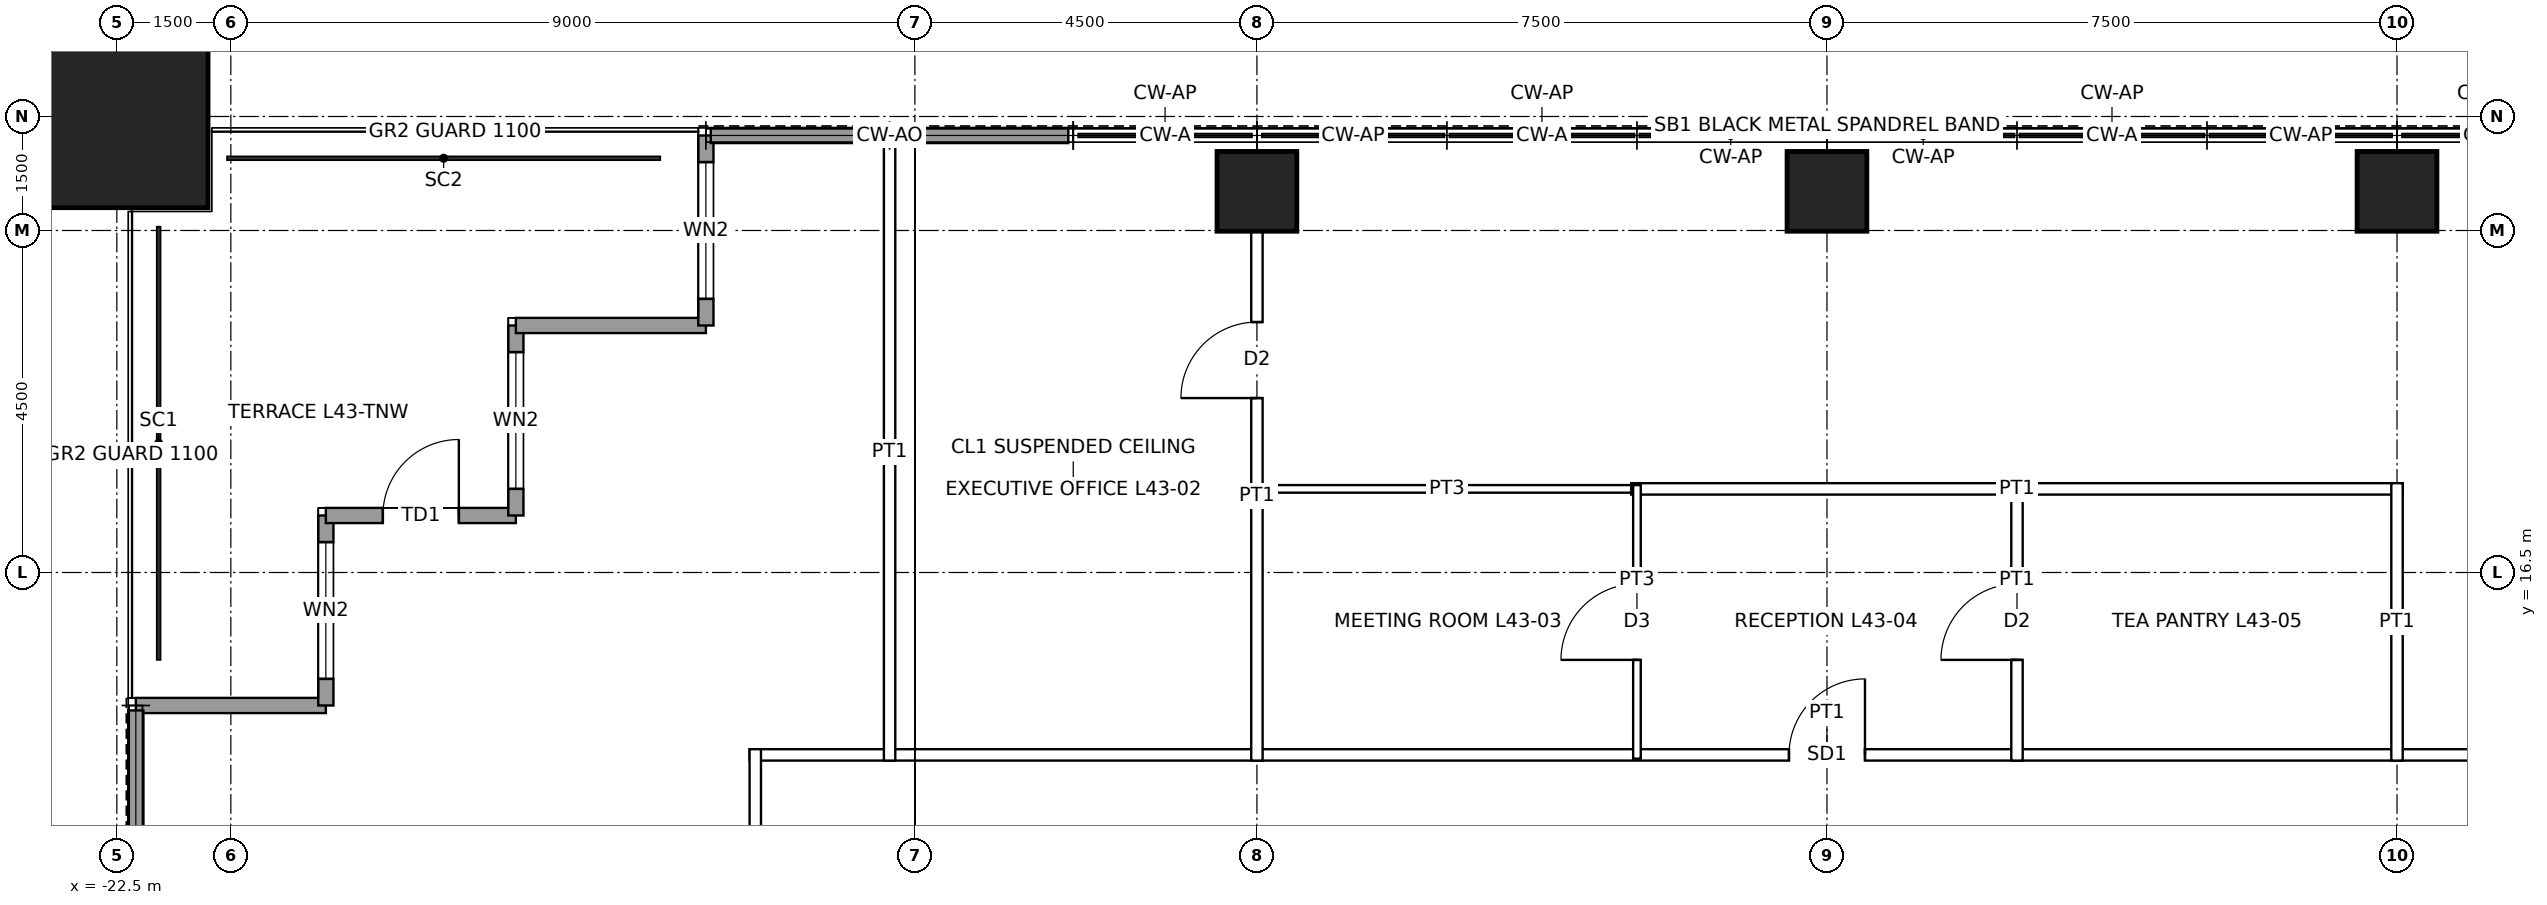
"""IFC4 building model, lengths in metres.
Left out: names, types, materials, properties, quantities, classifications, styles, units other than length and angle.
Written with IfcOpenShell. Run it as: python <this file> out.ifc"""

import sys

from ifc_helpers import new_model, si_unit, direction, frame, frame_2d, origin, origin_2d, place, context, subcontext, project, spatial, rectangle, hollow_rectangle, extrude, element, fill, save


model = new_model("IFC4")
c1 = context("Model", 3, precision=1e-05, world=origin(), true_north=direction((0.0, 1.0)))
c2 = subcontext(c1, "Body", "Model", "MODEL_VIEW")
j1 = project(units=[si_unit("LENGTHUNIT", "METRE"), si_unit("PLANEANGLEUNIT", "RADIAN")], contexts=[c1])
p1 = place(None, origin())
s1 = spatial("IfcSite", under=j1, at=p1, CompositionType="ELEMENT")
p2 = place(p1, origin())
s2 = spatial("IfcBuilding", under=s1, at=p2, CompositionType="ELEMENT")
p3 = place(p2, frame((0.0, 0.0, 205.9)))
s3 = spatial("IfcBuildingStorey", under=s2, at=p3, CompositionType="ELEMENT", Elevation=205.9)
p4 = place(p3, frame((-22.5, 22.5, 0.0), z_axis=(0.0, 0.0, 1.0), x_axis=(1.0, 0.0, 0.0)))
e1 = element("IfcColumn", 1, at=p4, inside=s3, PredefinedType="COLUMN", context=c2, shape_type="SweptSolid", body=[
    extrude(hollow_rectangle(XDim=2.4, YDim=2.4, WallThickness=0.12, at=origin_2d()), origin(), (0.0, 0.0, 1.0), 4.0),
])
for number, where, z_axis, x_axis in (
    (2, (-7.5, 21.515, 0.0), (0.0, 0.0, 1.0), (1.0, 0.0, 0.0)),
    (3, (0.0, 21.515, 0.0), (0.0, 0.0, 1.0), (1.0, 0.0, 0.0)),
    (4, (7.5, 21.515, 0.0), (0.0, 0.0, 1.0), (1.0, 0.0, 0.0)),
):
    element("IfcColumn", number, at=place(p3, frame(where, z_axis=z_axis, x_axis=x_axis)), inside=s3, PredefinedType="COLUMN", context=c2, shape_type="SweptSolid", body=[
        extrude(hollow_rectangle(XDim=1.05, YDim=1.05, WallThickness=0.07, at=origin_2d()), origin(), (0.0, 0.0, 1.0), 4.0),
    ])
p5 = place(p3, frame((-22.25, 14.75, 0.0), z_axis=(0.0, 0.0, 1.0), x_axis=(1.0, 0.0, 0.0)))
e5 = element("IfcWall", 5, at=p5, inside=s3, PredefinedType="SOLIDWALL", context=c2, shape_type="SweptSolid", body=[
    extrude(rectangle(XDim=2.5, YDim=0.2, at=frame_2d((1.25, 0.0))), origin(), (0.0, 0.0, 1.0), 3.85),
])
p6 = place(p3, frame((-19.75, 14.75, 0.0), z_axis=(0.0, 0.0, 1.0), x_axis=(0.0, 1.0, 0.0)))
e6 = element("IfcWall", 6, at=p6, inside=s3, PredefinedType="SOLIDWALL", context=c2, shape_type="SweptSolid", body=[
    extrude(rectangle(XDim=2.5, YDim=0.2, at=frame_2d((1.25, 0.0))), origin(), (0.0, 0.0, 1.0), 3.85),
])
p7 = place(p6, frame((0.35, 0.0, 0.3)))
e7 = element("IfcOpeningElement", 7, at=p7, cuts=e6, PredefinedType="OPENING", context=c2, shape_type="SweptSolid", body=[
    extrude(rectangle(XDim=1.8, YDim=2.4, at=frame_2d((0.9, 1.2))), frame((0.0, 0.11, 0.0), z_axis=(0.0, -1.0, 0.0), x_axis=(1.0, 0.0, 0.0)), (0.0, 0.0, 1.0), 0.22),
])
p8 = place(p3, frame((-19.75, 17.25, 0.0), z_axis=(0.0, 0.0, 1.0), x_axis=(1.0, 0.0, 0.0)))
e8 = element("IfcWall", 8, at=p8, inside=s3, PredefinedType="SOLIDWALL", context=c2, shape_type="SweptSolid", body=[
    extrude(rectangle(XDim=2.5, YDim=0.2, at=frame_2d((1.25, 0.0))), origin(), (0.0, 0.0, 1.0), 3.85),
])
p9 = place(p8, frame((0.75, 0.0, 0.0)))
e9 = element("IfcOpeningElement", 9, at=p9, cuts=e8, PredefinedType="OPENING", context=c2, shape_type="SweptSolid", body=[
    extrude(rectangle(XDim=1.0, YDim=2.4, at=frame_2d((0.5, 1.2))), frame((0.0, 0.11, 0.0), z_axis=(0.0, -1.0, 0.0), x_axis=(1.0, 0.0, 0.0)), (0.0, 0.0, 1.0), 0.22),
])
p10 = place(p3, frame((-17.25, 17.25, 0.0), z_axis=(0.0, 0.0, 1.0), x_axis=(0.0, 1.0, 0.0)))
e10 = element("IfcWall", 10, at=p10, inside=s3, PredefinedType="SOLIDWALL", context=c2, shape_type="SweptSolid", body=[
    extrude(rectangle(XDim=2.5, YDim=0.2, at=frame_2d((1.25, 0.0))), origin(), (0.0, 0.0, 1.0), 3.85),
])
p11 = place(p10, frame((0.35, 0.0, 0.3)))
e11 = element("IfcOpeningElement", 11, at=p11, cuts=e10, PredefinedType="OPENING", context=c2, shape_type="SweptSolid", body=[
    extrude(rectangle(XDim=1.8, YDim=2.4, at=frame_2d((0.9, 1.2))), frame((0.0, 0.11, 0.0), z_axis=(0.0, -1.0, 0.0), x_axis=(1.0, 0.0, 0.0)), (0.0, 0.0, 1.0), 0.22),
])
p12 = place(p3, frame((-17.25, 19.75, 0.0), z_axis=(0.0, 0.0, 1.0), x_axis=(1.0, 0.0, 0.0)))
e12 = element("IfcWall", 12, at=p12, inside=s3, PredefinedType="SOLIDWALL", context=c2, shape_type="SweptSolid", body=[
    extrude(rectangle(XDim=2.5, YDim=0.2, at=frame_2d((1.25, 0.0))), origin(), (0.0, 0.0, 1.0), 3.85),
])
p13 = place(p3, frame((-14.75, 19.75, 0.0), z_axis=(0.0, 0.0, 1.0), x_axis=(0.0, 1.0, 0.0)))
e13 = element("IfcWall", 13, at=p13, inside=s3, PredefinedType="SOLIDWALL", context=c2, shape_type="SweptSolid", body=[
    extrude(rectangle(XDim=2.5, YDim=0.2, at=frame_2d((1.25, 0.0))), origin(), (0.0, 0.0, 1.0), 3.85),
])
p14 = place(p13, frame((0.35, 0.0, 0.3)))
e14 = element("IfcOpeningElement", 14, at=p14, cuts=e13, PredefinedType="OPENING", context=c2, shape_type="SweptSolid", body=[
    extrude(rectangle(XDim=1.8, YDim=2.4, at=frame_2d((0.9, 1.2))), frame((0.0, 0.11, 0.0), z_axis=(0.0, -1.0, 0.0), x_axis=(1.0, 0.0, 0.0)), (0.0, 0.0, 1.0), 0.22),
])
for number, where, z_axis, x_axis in (
    (15, (-14.685, 22.25, 0.0), (0.0, 0.0, 1.0), (1.0, 0.0, 0.0)),
    (16, (-12.301, 22.25, 0.0), (0.0, 0.0, 1.0), (1.0, 0.0, 0.0)),
    (17, (-22.25, 12.366, 0.0), (0.0, 0.0, 1.0), (0.0, 1.0, 0.0)),
):
    element("IfcWall", number, at=place(p3, frame(where, z_axis=z_axis, x_axis=x_axis)), inside=s3, PredefinedType="SOLIDWALL", context=c2, shape_type="SweptSolid", body=[
        extrude(rectangle(XDim=2.319, YDim=0.2, at=frame_2d((1.16, 0.0))), origin(), (0.0, 0.0, 1.0), 3.85),
    ])
p15 = place(p3, frame((-14.175, 14.1, 0.0), z_axis=(0.0, 0.0, 1.0), x_axis=(1.0, 0.0, 0.0)))
e18 = element("IfcWall", 18, at=p15, inside=s3, PredefinedType="PARTITIONING", context=c2, shape_type="SweptSolid", body=[
    extrude(rectangle(XDim=28.35, YDim=0.15, at=frame_2d((14.175, 0.0))), origin(), (0.0, 0.0, 1.0), 3.85),
])
p16 = place(p15, frame((13.675, 0.0, 0.0)))
e19 = element("IfcOpeningElement", 19, at=p16, cuts=e18, PredefinedType="OPENING", context=c2, shape_type="SweptSolid", body=[
    extrude(rectangle(XDim=1.0, YDim=2.4, at=frame_2d((0.5, 1.2))), frame((0.0, 0.085, 0.0), z_axis=(0.0, -1.0, 0.0), x_axis=(1.0, 0.0, 0.0)), (0.0, 0.0, 1.0), 0.17),
])
p17 = place(p15, frame((24.475, 0.0, 0.0)))
e20 = element("IfcOpeningElement", 20, at=p17, cuts=e18, PredefinedType="OPENING", context=c2, shape_type="SweptSolid", body=[
    extrude(rectangle(XDim=1.0, YDim=2.4, at=frame_2d((0.5, 1.2))), frame((0.0, 0.085, 0.0), z_axis=(0.0, -1.0, 0.0), x_axis=(1.0, 0.0, 0.0)), (0.0, 0.0, 1.0), 0.17),
])
p18 = place(p3, frame((-7.55, 17.6, 0.0), z_axis=(0.0, 0.0, 1.0), x_axis=(1.0, 0.0, 0.0)))
e21 = element("IfcWall", 21, at=p18, inside=s3, PredefinedType="PARTITIONING", context=c2, shape_type="SweptSolid", body=[
    extrude(rectangle(XDim=5.1, YDim=0.1, at=frame_2d((2.55, 0.0))), origin(), (0.0, 0.0, 1.0), 3.85),
])
p19 = place(p3, frame((-2.575, 17.6, 0.0), z_axis=(0.0, 0.0, 1.0), x_axis=(1.0, 0.0, 0.0)))
e22 = element("IfcWall", 22, at=p19, inside=s3, PredefinedType="PARTITIONING", context=c2, shape_type="SweptSolid", body=[
    extrude(rectangle(XDim=10.15, YDim=0.15, at=frame_2d((5.075, 0.0))), origin(), (0.0, 0.0, 1.0), 3.85),
])
p20 = place(p3, frame((-14.1, -14.175, 0.0), z_axis=(0.0, 0.0, 1.0), x_axis=(0.0, 1.0, 0.0)))
e23 = element("IfcWall", 23, at=p20, inside=s3, PredefinedType="PARTITIONING", context=c2, shape_type="SweptSolid", body=[
    extrude(rectangle(XDim=28.35, YDim=0.15, at=frame_2d((14.175, 0.0))), origin(), (0.0, 0.0, 1.0), 3.85),
])
p21 = place(p20, frame((12.075, 0.0, 0.0)))
e24 = element("IfcOpeningElement", 24, at=p21, cuts=e23, PredefinedType="OPENING", context=c2, shape_type="SweptSolid", body=[
    extrude(rectangle(XDim=1.0, YDim=2.4, at=frame_2d((0.5, 1.2))), frame((0.0, 0.085, 0.0), z_axis=(0.0, -1.0, 0.0), x_axis=(1.0, 0.0, 0.0)), (0.0, 0.0, 1.0), 0.17),
])
p22 = place(p20, frame((2.875, 0.0, 0.0)))
e25 = element("IfcOpeningElement", 25, at=p22, cuts=e23, PredefinedType="OPENING", context=c2, shape_type="SweptSolid", body=[
    extrude(rectangle(XDim=1.0, YDim=2.4, at=frame_2d((0.5, 1.2))), frame((0.0, 0.085, 0.0), z_axis=(0.0, -1.0, 0.0), x_axis=(1.0, 0.0, 0.0)), (0.0, 0.0, 1.0), 0.17),
])
p23 = place(p3, frame((-12.333, 14.025, 0.0), z_axis=(0.0, 0.0, 1.0), x_axis=(0.0, 1.0, 0.0)))
e26 = element("IfcWall", 26, at=p23, inside=s3, PredefinedType="PARTITIONING", context=c2, shape_type="SweptSolid", body=[
    extrude(rectangle(XDim=8.125, YDim=0.15, at=frame_2d((4.062, 0.0))), origin(), (0.0, 0.0, 1.0), 3.85),
])
p24 = place(p3, frame((-7.5, 14.025, 0.0), z_axis=(0.0, 0.0, 1.0), x_axis=(0.0, 1.0, 0.0)))
e27 = element("IfcWall", 27, at=p24, inside=s3, PredefinedType="PARTITIONING", context=c2, shape_type="SweptSolid", body=[
    extrude(rectangle(XDim=6.965, YDim=0.15, at=frame_2d((3.482, 0.0))), origin(), (0.0, 0.0, 1.0), 3.238),
])
p25 = place(p24, frame((4.77, 0.0, 0.0)))
e28 = element("IfcOpeningElement", 28, at=p25, cuts=e27, PredefinedType="OPENING", context=c2, shape_type="SweptSolid", body=[
    extrude(rectangle(XDim=1.0, YDim=2.1, at=frame_2d((0.5, 1.05))), frame((0.0, 0.085, 0.0), z_axis=(0.0, -1.0, 0.0), x_axis=(1.0, 0.0, 0.0)), (0.0, 0.0, 1.0), 0.17),
])
p26 = place(p3, frame((-2.5, 14.05, 0.0), z_axis=(0.0, 0.0, 1.0), x_axis=(0.0, 1.0, 0.0)))
e29 = element("IfcWall", 29, at=p26, inside=s3, PredefinedType="PARTITIONING", context=c2, shape_type="SweptSolid", body=[
    extrude(rectangle(XDim=3.6, YDim=0.1, at=frame_2d((1.8, 0.0))), origin(), (0.0, 0.0, 1.0), 3.85),
])
p27 = place(p26, frame((1.3, 0.0, 0.0)))
e30 = element("IfcOpeningElement", 30, at=p27, cuts=e29, PredefinedType="OPENING", context=c2, shape_type="SweptSolid", body=[
    extrude(rectangle(XDim=1.0, YDim=2.1, at=frame_2d((0.5, 1.05))), frame((0.0, 0.06, 0.0), z_axis=(0.0, -1.0, 0.0), x_axis=(1.0, 0.0, 0.0)), (0.0, 0.0, 1.0), 0.12),
])
p28 = place(p3, frame((2.5, 14.025, 0.0), z_axis=(0.0, 0.0, 1.0), x_axis=(0.0, 1.0, 0.0)))
e31 = element("IfcWall", 31, at=p28, inside=s3, PredefinedType="PARTITIONING", context=c2, shape_type="SweptSolid", body=[
    extrude(rectangle(XDim=3.65, YDim=0.15, at=frame_2d((1.825, 0.0))), origin(), (0.0, 0.0, 1.0), 3.85),
])
p29 = place(p28, frame((1.325, 0.0, 0.0)))
e32 = element("IfcOpeningElement", 32, at=p29, cuts=e31, PredefinedType="OPENING", context=c2, shape_type="SweptSolid", body=[
    extrude(rectangle(XDim=1.0, YDim=2.1, at=frame_2d((0.5, 1.05))), frame((0.0, 0.085, 0.0), z_axis=(0.0, -1.0, 0.0), x_axis=(1.0, 0.0, 0.0)), (0.0, 0.0, 1.0), 0.17),
])
p30 = place(p3, frame((7.5, 14.025, 0.0), z_axis=(0.0, 0.0, 1.0), x_axis=(0.0, 1.0, 0.0)))
e33 = element("IfcWall", 33, at=p30, inside=s3, PredefinedType="PARTITIONING", context=c2, shape_type="SweptSolid", body=[
    extrude(rectangle(XDim=3.65, YDim=0.15, at=frame_2d((1.825, 0.0))), origin(), (0.0, 0.0, 1.0), 3.238),
])
p31 = place(p7, origin())
e34 = element("IfcWindow", 34, at=p31, inside=s3, PartitioningType="SINGLE_PANEL", PredefinedType="WINDOW", context=c2, shape_type="SweptSolid", body=[
    extrude(rectangle(XDim=1.8, YDim=2.4, at=frame_2d((0.9, 1.2))), frame((0.0, 0.03, 0.0), z_axis=(0.0, -1.0, 0.0), x_axis=(1.0, 0.0, 0.0)), (0.0, 0.0, 1.0), 0.06),
])
fill(e7, e34)
p32 = place(p9, origin())
e35 = element("IfcDoor", 35, at=p32, inside=s3, OperationType="SINGLE_SWING_RIGHT", PredefinedType="DOOR", context=c2, shape_type="SweptSolid", body=[
    extrude(rectangle(XDim=1.0, YDim=2.4, at=frame_2d((0.5, 1.2))), frame((0.0, 0.025, 0.0), z_axis=(0.0, -1.0, 0.0), x_axis=(1.0, 0.0, 0.0)), (0.0, 0.0, 1.0), 0.05),
])
fill(e9, e35)
p33 = place(p11, origin())
e36 = element("IfcWindow", 36, at=p33, inside=s3, PartitioningType="SINGLE_PANEL", PredefinedType="WINDOW", context=c2, shape_type="SweptSolid", body=[
    extrude(rectangle(XDim=1.8, YDim=2.4, at=frame_2d((0.9, 1.2))), frame((0.0, 0.03, 0.0), z_axis=(0.0, -1.0, 0.0), x_axis=(1.0, 0.0, 0.0)), (0.0, 0.0, 1.0), 0.06),
])
fill(e11, e36)
p34 = place(p14, origin())
e37 = element("IfcWindow", 37, at=p34, inside=s3, PartitioningType="SINGLE_PANEL", PredefinedType="WINDOW", context=c2, shape_type="SweptSolid", body=[
    extrude(rectangle(XDim=1.8, YDim=2.4, at=frame_2d((0.9, 1.2))), frame((0.0, 0.03, 0.0), z_axis=(0.0, -1.0, 0.0), x_axis=(1.0, 0.0, 0.0)), (0.0, 0.0, 1.0), 0.06),
])
fill(e14, e37)
p35 = place(p25, origin())
e38 = element("IfcDoor", 38, at=p35, inside=s3, OperationType="SINGLE_SWING_LEFT", PredefinedType="DOOR", context=c2, shape_type="SweptSolid", body=[
    extrude(rectangle(XDim=1.0, YDim=2.1, at=frame_2d((0.5, 1.05))), frame((0.0, 0.025, 0.0), z_axis=(0.0, -1.0, 0.0), x_axis=(1.0, 0.0, 0.0)), (0.0, 0.0, 1.0), 0.05),
])
fill(e28, e38)
p36 = place(p27, origin())
e39 = element("IfcDoor", 39, at=p36, inside=s3, OperationType="SINGLE_SWING_LEFT", PredefinedType="DOOR", context=c2, shape_type="SweptSolid", body=[
    extrude(rectangle(XDim=1.0, YDim=2.1, at=frame_2d((0.5, 1.05))), frame((0.0, 0.025, 0.0), z_axis=(0.0, -1.0, 0.0), x_axis=(1.0, 0.0, 0.0)), (0.0, 0.0, 1.0), 0.05),
])
fill(e30, e39)
p37 = place(p16, origin())
e40 = element("IfcDoor", 40, at=p37, inside=s3, OperationType="SINGLE_SWING_RIGHT", PredefinedType="DOOR", context=c2, shape_type="SweptSolid", body=[
    extrude(rectangle(XDim=1.0, YDim=2.4, at=frame_2d((0.5, 1.2))), frame((0.0, 0.025, 0.0), z_axis=(0.0, -1.0, 0.0), x_axis=(1.0, 0.0, 0.0)), (0.0, 0.0, 1.0), 0.05),
])
fill(e19, e40)
p38 = place(p29, origin())
e41 = element("IfcDoor", 41, at=p38, inside=s3, OperationType="SINGLE_SWING_LEFT", PredefinedType="DOOR", context=c2, shape_type="SweptSolid", body=[
    extrude(rectangle(XDim=1.0, YDim=2.1, at=frame_2d((0.5, 1.05))), frame((0.0, 0.025, 0.0), z_axis=(0.0, -1.0, 0.0), x_axis=(1.0, 0.0, 0.0)), (0.0, 0.0, 1.0), 0.05),
])
fill(e32, e41)
save(model, sys.argv[1])
